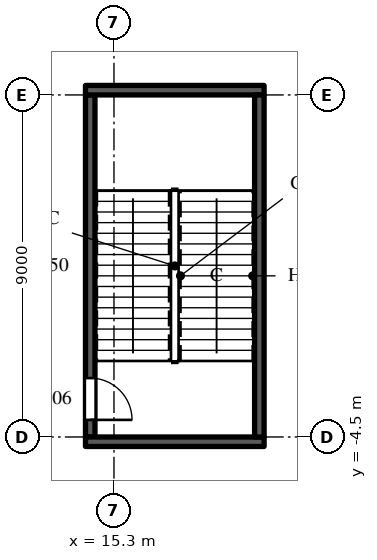
"""IFC4 building model, lengths in metres.
Left out: names, types, materials, properties, quantities, classifications, styles, units other than length and angle.
Written with IfcOpenShell. Run it as: python <this file> out.ifc"""

import sys

from ifc_helpers import new_model, si_unit, direction, frame, frame_2d, origin, place, context, subcontext, project, spatial, rectangle, extrude, element, fill, save


model = new_model("IFC4")
c1 = context("Model", 3, precision=1e-05, world=origin(), true_north=direction((0.0, 1.0)))
c2 = subcontext(c1, "Body", "Model", "MODEL_VIEW")
j1 = project(units=[si_unit("LENGTHUNIT", "METRE"), si_unit("PLANEANGLEUNIT", "RADIAN")], contexts=[c1])
p1 = place(None, origin())
s1 = spatial("IfcSite", under=j1, at=p1, CompositionType="ELEMENT")
p2 = place(p1, origin())
s2 = spatial("IfcBuilding", under=s1, at=p2, CompositionType="ELEMENT")
p3 = place(p2, frame((0.0, 0.0, 44.0)))
s3 = spatial("IfcBuildingStorey", under=s2, at=p3, CompositionType="ELEMENT", Elevation=44.0)
p4 = place(p3, frame((14.675, -4.5, 0.0), z_axis=(0.0, 0.0, 1.0), x_axis=(0.0, 1.0, 0.0)))
e1 = element("IfcWall", 1, at=p4, inside=s3, PredefinedType="SHEAR", context=c2, shape_type="SweptSolid", body=[
    extrude(rectangle(XDim=9.0, YDim=0.25, at=frame_2d((4.5, 0.0))), origin(), (0.0, 0.0, 1.0), 5.7),
])
p5 = place(p4, frame((0.45, 0.0, 0.0)))
e2 = element("IfcOpeningElement", 2, at=p5, cuts=e1, PredefinedType="OPENING", context=c2, shape_type="SweptSolid", body=[
    extrude(rectangle(XDim=1.1, YDim=2.2, at=frame_2d((0.55, 1.1))), frame((0.0, 0.135, 0.0), z_axis=(0.0, -1.0, 0.0), x_axis=(1.0, 0.0, 0.0)), (0.0, 0.0, 1.0), 0.27),
])
for number, where, z_axis, x_axis in (
    (3, (14.55, -4.625, 0.0), (0.0, 0.0, 1.0), (1.0, 0.0, 0.0)),
    (4, (14.55, 4.625, 0.0), (0.0, 0.0, 1.0), (1.0, 0.0, 0.0)),
):
    element("IfcWall", number, at=place(p3, frame(where, z_axis=z_axis, x_axis=x_axis)), inside=s3, PredefinedType="SHEAR", context=c2, shape_type="SweptSolid", body=[
        extrude(rectangle(XDim=4.7, YDim=0.25, at=frame_2d((2.35, 0.0))), origin(), (0.0, 0.0, 1.0), 5.7),
    ])
p6 = place(p3, frame((19.125, -4.5, 0.0), z_axis=(0.0, 0.0, 1.0), x_axis=(0.0, 1.0, 0.0)))
e5 = element("IfcWall", 5, at=p6, inside=s3, PredefinedType="SHEAR", context=c2, shape_type="SweptSolid", body=[
    extrude(rectangle(XDim=9.0, YDim=0.25, at=frame_2d((4.5, 0.0))), origin(), (0.0, 0.0, 1.0), 5.7),
])
p7 = place(p5, origin())
e6 = element("IfcDoor", 6, at=p7, inside=s3, OperationType="SINGLE_SWING_RIGHT", PredefinedType="DOOR", context=c2, shape_type="SweptSolid", body=[
    extrude(rectangle(XDim=1.1, YDim=2.2, at=frame_2d((0.55, 1.1))), frame((0.0, 0.025, 0.0), z_axis=(0.0, -1.0, 0.0), x_axis=(1.0, 0.0, 0.0)), (0.0, 0.0, 1.0), 0.05),
])
fill(e2, e6)
save(model, sys.argv[1])
